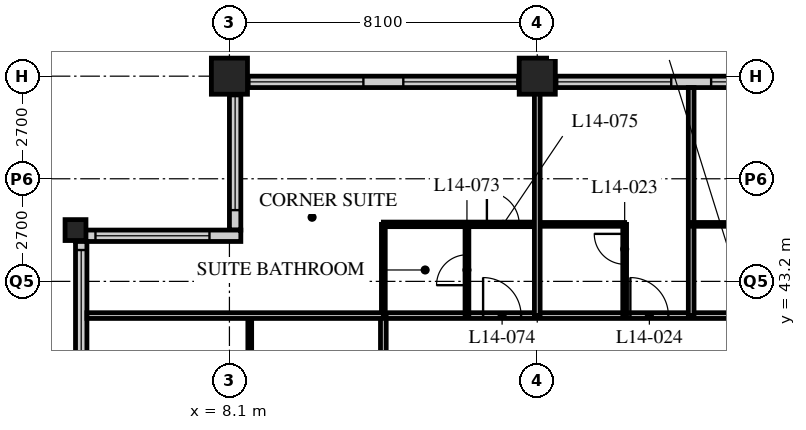
"""IFC4 building model, lengths in metres.
Left out: names, types, materials, properties, quantities, classifications, styles, units other than length and angle.
Written with IfcOpenShell. Run it as: python <this file> out.ifc"""

import sys

from ifc_helpers import new_model, si_unit, direction, frame, frame_2d, origin, origin_2d, place, context, subcontext, project, spatial, rectangle, hollow_rectangle, extrude, element, fill, save


model = new_model("IFC4")
c1 = context("Model", 3, precision=1e-05, world=origin(), true_north=direction((0.0, 1.0)))
c2 = subcontext(c1, "Body", "Model", "MODEL_VIEW")
j1 = project(units=[si_unit("LENGTHUNIT", "METRE"), si_unit("PLANEANGLEUNIT", "RADIAN")], contexts=[c1])
p1 = place(None, origin())
s1 = spatial("IfcSite", under=j1, at=p1, CompositionType="ELEMENT")
p2 = place(p1, origin())
s2 = spatial("IfcBuilding", under=s1, at=p2, CompositionType="ELEMENT")
p3 = place(p2, frame((0.0, 0.0, 60.2)))
s3 = spatial("IfcBuildingStorey", under=s2, at=p3, CompositionType="ELEMENT", Elevation=60.2)
p4 = place(p3, frame((4.05, 44.55, 0.0), z_axis=(0.0, 0.0, 1.0), x_axis=(1.0, 0.0, 0.0)))
e1 = element("IfcColumn", 1, at=p4, inside=s3, PredefinedType="COLUMN", context=c2, shape_type="SweptSolid", body=[
    extrude(hollow_rectangle(XDim=0.55, YDim=0.55, WallThickness=0.05, at=origin_2d()), origin(), (0.0, 0.0, 1.0), 3.4),
])
for number, where, z_axis, x_axis in (
    (2, (8.1, 48.6, 0.0), (0.0, 0.0, 1.0), (1.0, 0.0, 0.0)),
    (3, (16.2, 48.6, 0.0), (0.0, 0.0, 1.0), (1.0, 0.0, 0.0)),
):
    element("IfcColumn", number, at=place(p3, frame(where, z_axis=z_axis, x_axis=x_axis)), inside=s3, PredefinedType="COLUMN", context=c2, shape_type="SweptSolid", body=[
        extrude(hollow_rectangle(XDim=0.95, YDim=0.95, WallThickness=0.095, at=origin_2d()), origin(), (0.0, 0.0, 1.0), 3.4),
    ])
p5 = place(p3, frame((48.3, 48.45, 0.0), z_axis=(0.0, 0.0, 1.0), x_axis=(-1.0, 0.0, 0.0)))
e4 = element("IfcWall", 4, at=p5, inside=s3, PredefinedType="SOLIDWALL", context=c2, shape_type="SweptSolid", body=[
    extrude(rectangle(XDim=40.2, YDim=0.3, at=frame_2d((20.1, 0.0))), origin(), (0.0, 0.0, 1.0), 3.19),
])
p6 = place(p5, frame((0.225, 0.0, 0.9)))
e5 = element("IfcOpeningElement", 5, at=p6, cuts=e4, PredefinedType="OPENING", context=c2, shape_type="SweptSolid", body=[
    extrude(rectangle(XDim=3.0, YDim=2.0, at=frame_2d((1.5, 1.0))), frame((0.0, 0.16, 0.0), z_axis=(0.0, -1.0, 0.0), x_axis=(1.0, 0.0, 0.0)), (0.0, 0.0, 1.0), 0.32),
])
p7 = place(p5, frame((4.275, 0.0, 0.9)))
e6 = element("IfcOpeningElement", 6, at=p7, cuts=e4, PredefinedType="OPENING", context=c2, shape_type="SweptSolid", body=[
    extrude(rectangle(XDim=3.0, YDim=2.0, at=frame_2d((1.5, 1.0))), frame((0.0, 0.16, 0.0), z_axis=(0.0, -1.0, 0.0), x_axis=(1.0, 0.0, 0.0)), (0.0, 0.0, 1.0), 0.32),
])
p8 = place(p5, frame((8.325, 0.0, 0.9)))
e7 = element("IfcOpeningElement", 7, at=p8, cuts=e4, PredefinedType="OPENING", context=c2, shape_type="SweptSolid", body=[
    extrude(rectangle(XDim=3.0, YDim=2.0, at=frame_2d((1.5, 1.0))), frame((0.0, 0.16, 0.0), z_axis=(0.0, -1.0, 0.0), x_axis=(1.0, 0.0, 0.0)), (0.0, 0.0, 1.0), 0.32),
])
p9 = place(p5, frame((12.375, 0.0, 0.9)))
e8 = element("IfcOpeningElement", 8, at=p9, cuts=e4, PredefinedType="OPENING", context=c2, shape_type="SweptSolid", body=[
    extrude(rectangle(XDim=3.0, YDim=2.0, at=frame_2d((1.5, 1.0))), frame((0.0, 0.16, 0.0), z_axis=(0.0, -1.0, 0.0), x_axis=(1.0, 0.0, 0.0)), (0.0, 0.0, 1.0), 0.32),
])
p10 = place(p5, frame((16.425, 0.0, 0.9)))
e9 = element("IfcOpeningElement", 9, at=p10, cuts=e4, PredefinedType="OPENING", context=c2, shape_type="SweptSolid", body=[
    extrude(rectangle(XDim=3.0, YDim=2.0, at=frame_2d((1.5, 1.0))), frame((0.0, 0.16, 0.0), z_axis=(0.0, -1.0, 0.0), x_axis=(1.0, 0.0, 0.0)), (0.0, 0.0, 1.0), 0.32),
])
p11 = place(p5, frame((20.475, 0.0, 0.9)))
e10 = element("IfcOpeningElement", 10, at=p11, cuts=e4, PredefinedType="OPENING", context=c2, shape_type="SweptSolid", body=[
    extrude(rectangle(XDim=3.0, YDim=2.0, at=frame_2d((1.5, 1.0))), frame((0.0, 0.16, 0.0), z_axis=(0.0, -1.0, 0.0), x_axis=(1.0, 0.0, 0.0)), (0.0, 0.0, 1.0), 0.32),
])
p12 = place(p5, frame((24.525, 0.0, 0.9)))
e11 = element("IfcOpeningElement", 11, at=p12, cuts=e4, PredefinedType="OPENING", context=c2, shape_type="SweptSolid", body=[
    extrude(rectangle(XDim=3.0, YDim=2.0, at=frame_2d((1.5, 1.0))), frame((0.0, 0.16, 0.0), z_axis=(0.0, -1.0, 0.0), x_axis=(1.0, 0.0, 0.0)), (0.0, 0.0, 1.0), 0.32),
])
p13 = place(p5, frame((28.575, 0.0, 0.9)))
e12 = element("IfcOpeningElement", 12, at=p13, cuts=e4, PredefinedType="OPENING", context=c2, shape_type="SweptSolid", body=[
    extrude(rectangle(XDim=3.0, YDim=2.0, at=frame_2d((1.5, 1.0))), frame((0.0, 0.16, 0.0), z_axis=(0.0, -1.0, 0.0), x_axis=(1.0, 0.0, 0.0)), (0.0, 0.0, 1.0), 0.32),
])
p14 = place(p5, frame((32.625, 0.0, 0.9)))
e13 = element("IfcOpeningElement", 13, at=p14, cuts=e4, PredefinedType="OPENING", context=c2, shape_type="SweptSolid", body=[
    extrude(rectangle(XDim=3.0, YDim=2.0, at=frame_2d((1.5, 1.0))), frame((0.0, 0.16, 0.0), z_axis=(0.0, -1.0, 0.0), x_axis=(1.0, 0.0, 0.0)), (0.0, 0.0, 1.0), 0.32),
])
p15 = place(p5, frame((36.675, 0.0, 0.9)))
e14 = element("IfcOpeningElement", 14, at=p15, cuts=e4, PredefinedType="OPENING", context=c2, shape_type="SweptSolid", body=[
    extrude(rectangle(XDim=3.0, YDim=2.0, at=frame_2d((1.5, 1.0))), frame((0.0, 0.16, 0.0), z_axis=(0.0, -1.0, 0.0), x_axis=(1.0, 0.0, 0.0)), (0.0, 0.0, 1.0), 0.32),
])
p16 = place(p3, frame((8.25, 48.3, 0.0), z_axis=(0.0, 0.0, 1.0), x_axis=(0.0, -1.0, 0.0)))
e15 = element("IfcWall", 15, at=p16, inside=s3, PredefinedType="SOLIDWALL", context=c2, shape_type="SweptSolid", body=[
    extrude(rectangle(XDim=3.75, YDim=0.3, at=frame_2d((1.875, 0.0))), origin(), (0.0, 0.0, 1.0), 3.19),
])
p17 = place(p16, frame((0.225, 0.0, 0.9)))
e16 = element("IfcOpeningElement", 16, at=p17, cuts=e15, PredefinedType="OPENING", context=c2, shape_type="SweptSolid", body=[
    extrude(rectangle(XDim=3.0, YDim=1.5, at=frame_2d((1.5, 0.75))), frame((0.0, 0.16, 0.0), z_axis=(0.0, -1.0, 0.0), x_axis=(1.0, 0.0, 0.0)), (0.0, 0.0, 1.0), 0.32),
])
p18 = place(p3, frame((8.4, 44.4, 0.0), z_axis=(0.0, 0.0, 1.0), x_axis=(-1.0, 0.0, 0.0)))
e17 = element("IfcWall", 17, at=p18, inside=s3, PredefinedType="SOLIDWALL", context=c2, shape_type="SweptSolid", body=[
    extrude(rectangle(XDim=4.35, YDim=0.3, at=frame_2d((2.175, 0.0))), origin(), (0.0, 0.0, 1.0), 3.19),
])
p19 = place(p18, frame((0.825, 0.0, 0.9)))
e18 = element("IfcOpeningElement", 18, at=p19, cuts=e17, PredefinedType="OPENING", context=c2, shape_type="SweptSolid", body=[
    extrude(rectangle(XDim=3.0, YDim=1.5, at=frame_2d((1.5, 0.75))), frame((0.0, 0.16, 0.0), z_axis=(0.0, -1.0, 0.0), x_axis=(1.0, 0.0, 0.0)), (0.0, 0.0, 1.0), 0.32),
])
p20 = place(p3, frame((4.2, 44.25, 0.0), z_axis=(0.0, 0.0, 1.0), x_axis=(0.0, -1.0, 0.0)))
e19 = element("IfcWall", 19, at=p20, inside=s3, PredefinedType="SOLIDWALL", context=c2, shape_type="SweptSolid", body=[
    extrude(rectangle(XDim=3.75, YDim=0.3, at=frame_2d((1.875, 0.0))), origin(), (0.0, 0.0, 1.0), 3.19),
])
p21 = place(p20, frame((0.225, 0.0, 0.9)))
e20 = element("IfcOpeningElement", 20, at=p21, cuts=e19, PredefinedType="OPENING", context=c2, shape_type="SweptSolid", body=[
    extrude(rectangle(XDim=3.0, YDim=1.5, at=frame_2d((1.5, 0.75))), frame((0.0, 0.16, 0.0), z_axis=(0.0, -1.0, 0.0), x_axis=(1.0, 0.0, 0.0)), (0.0, 0.0, 1.0), 0.32),
])
p22 = place(p3, frame((12.15, 42.3, 0.0), z_axis=(0.0, 0.0, 1.0), x_axis=(1.0, 0.0, 0.0)))
e21 = element("IfcWall", 21, at=p22, inside=s3, PredefinedType="PARTITIONING", context=c2, shape_type="SweptSolid", body=[
    extrude(rectangle(XDim=32.4, YDim=0.15, at=frame_2d((16.2, 0.0))), origin(), (0.0, 0.0, 1.0), 3.19),
])
p23 = place(p22, frame((6.5, 0.0, 0.0)))
e22 = element("IfcOpeningElement", 22, at=p23, cuts=e21, PredefinedType="OPENING", context=c2, shape_type="SweptSolid", body=[
    extrude(rectangle(XDim=1.0, YDim=2.1, at=frame_2d((0.5, 1.05))), frame((0.0, 0.085, 0.0), z_axis=(0.0, -1.0, 0.0), x_axis=(1.0, 0.0, 0.0)), (0.0, 0.0, 1.0), 0.17),
])
p24 = place(p22, frame((10.55, 0.0, 0.0)))
e23 = element("IfcOpeningElement", 23, at=p24, cuts=e21, PredefinedType="OPENING", context=c2, shape_type="SweptSolid", body=[
    extrude(rectangle(XDim=1.0, YDim=2.1, at=frame_2d((0.5, 1.05))), frame((0.0, 0.085, 0.0), z_axis=(0.0, -1.0, 0.0), x_axis=(1.0, 0.0, 0.0)), (0.0, 0.0, 1.0), 0.17),
])
p25 = place(p22, frame((14.6, 0.0, 0.0)))
e24 = element("IfcOpeningElement", 24, at=p25, cuts=e21, PredefinedType="OPENING", context=c2, shape_type="SweptSolid", body=[
    extrude(rectangle(XDim=1.0, YDim=2.1, at=frame_2d((0.5, 1.05))), frame((0.0, 0.085, 0.0), z_axis=(0.0, -1.0, 0.0), x_axis=(1.0, 0.0, 0.0)), (0.0, 0.0, 1.0), 0.17),
])
p26 = place(p22, frame((18.65, 0.0, 0.0)))
e25 = element("IfcOpeningElement", 25, at=p26, cuts=e21, PredefinedType="OPENING", context=c2, shape_type="SweptSolid", body=[
    extrude(rectangle(XDim=1.0, YDim=2.1, at=frame_2d((0.5, 1.05))), frame((0.0, 0.085, 0.0), z_axis=(0.0, -1.0, 0.0), x_axis=(1.0, 0.0, 0.0)), (0.0, 0.0, 1.0), 0.17),
])
p27 = place(p22, frame((22.7, 0.0, 0.0)))
e26 = element("IfcOpeningElement", 26, at=p27, cuts=e21, PredefinedType="OPENING", context=c2, shape_type="SweptSolid", body=[
    extrude(rectangle(XDim=1.0, YDim=2.1, at=frame_2d((0.5, 1.05))), frame((0.0, 0.085, 0.0), z_axis=(0.0, -1.0, 0.0), x_axis=(1.0, 0.0, 0.0)), (0.0, 0.0, 1.0), 0.17),
])
p28 = place(p22, frame((26.75, 0.0, 0.0)))
e27 = element("IfcOpeningElement", 27, at=p28, cuts=e21, PredefinedType="OPENING", context=c2, shape_type="SweptSolid", body=[
    extrude(rectangle(XDim=1.0, YDim=2.1, at=frame_2d((0.5, 1.05))), frame((0.0, 0.085, 0.0), z_axis=(0.0, -1.0, 0.0), x_axis=(1.0, 0.0, 0.0)), (0.0, 0.0, 1.0), 0.17),
])
p29 = place(p22, frame((28.775, 0.0, 0.0)))
e28 = element("IfcOpeningElement", 28, at=p29, cuts=e21, PredefinedType="OPENING", context=c2, shape_type="SweptSolid", body=[
    extrude(rectangle(XDim=1.0, YDim=2.1, at=frame_2d((0.5, 1.05))), frame((0.0, 0.085, 0.0), z_axis=(0.0, -1.0, 0.0), x_axis=(1.0, 0.0, 0.0)), (0.0, 0.0, 1.0), 0.17),
])
p30 = place(p22, frame((2.625, 0.0, 0.0)))
e29 = element("IfcOpeningElement", 29, at=p30, cuts=e21, PredefinedType="OPENING", context=c2, shape_type="SweptSolid", body=[
    extrude(rectangle(XDim=1.0, YDim=2.1, at=frame_2d((0.5, 1.05))), frame((0.0, 0.085, 0.0), z_axis=(0.0, -1.0, 0.0), x_axis=(1.0, 0.0, 0.0)), (0.0, 0.0, 1.0), 0.17),
])
p31 = place(p3, frame((12.15, 12.15, 0.0), z_axis=(0.0, 0.0, 1.0), x_axis=(0.0, 1.0, 0.0)))
e30 = element("IfcWall", 30, at=p31, inside=s3, PredefinedType="PARTITIONING", context=c2, shape_type="SweptSolid", body=[
    extrude(rectangle(XDim=30.15, YDim=0.15, at=frame_2d((15.075, 0.0))), origin(), (0.0, 0.0, 1.0), 3.19),
])
p32 = place(p31, frame((2.45, 0.0, 0.0)))
e31 = element("IfcOpeningElement", 31, at=p32, cuts=e30, PredefinedType="OPENING", context=c2, shape_type="SweptSolid", body=[
    extrude(rectangle(XDim=1.0, YDim=2.1, at=frame_2d((0.5, 1.05))), frame((0.0, 0.085, 0.0), z_axis=(0.0, -1.0, 0.0), x_axis=(1.0, 0.0, 0.0)), (0.0, 0.0, 1.0), 0.17),
])
p33 = place(p31, frame((6.5, 0.0, 0.0)))
e32 = element("IfcOpeningElement", 32, at=p33, cuts=e30, PredefinedType="OPENING", context=c2, shape_type="SweptSolid", body=[
    extrude(rectangle(XDim=1.0, YDim=2.1, at=frame_2d((0.5, 1.05))), frame((0.0, 0.085, 0.0), z_axis=(0.0, -1.0, 0.0), x_axis=(1.0, 0.0, 0.0)), (0.0, 0.0, 1.0), 0.17),
])
p34 = place(p31, frame((10.55, 0.0, 0.0)))
e33 = element("IfcOpeningElement", 33, at=p34, cuts=e30, PredefinedType="OPENING", context=c2, shape_type="SweptSolid", body=[
    extrude(rectangle(XDim=1.0, YDim=2.1, at=frame_2d((0.5, 1.05))), frame((0.0, 0.085, 0.0), z_axis=(0.0, -1.0, 0.0), x_axis=(1.0, 0.0, 0.0)), (0.0, 0.0, 1.0), 0.17),
])
p35 = place(p31, frame((14.6, 0.0, 0.0)))
e34 = element("IfcOpeningElement", 34, at=p35, cuts=e30, PredefinedType="OPENING", context=c2, shape_type="SweptSolid", body=[
    extrude(rectangle(XDim=1.0, YDim=2.1, at=frame_2d((0.5, 1.05))), frame((0.0, 0.085, 0.0), z_axis=(0.0, -1.0, 0.0), x_axis=(1.0, 0.0, 0.0)), (0.0, 0.0, 1.0), 0.17),
])
p36 = place(p31, frame((21.65, 0.0, 0.0)))
e35 = element("IfcOpeningElement", 35, at=p36, cuts=e30, PredefinedType="OPENING", context=c2, shape_type="SweptSolid", body=[
    extrude(rectangle(XDim=1.0, YDim=2.1, at=frame_2d((0.5, 1.05))), frame((0.0, 0.085, 0.0), z_axis=(0.0, -1.0, 0.0), x_axis=(1.0, 0.0, 0.0)), (0.0, 0.0, 1.0), 0.17),
])
p37 = place(p31, frame((26.7, 0.0, 0.0)))
e36 = element("IfcOpeningElement", 36, at=p37, cuts=e30, PredefinedType="OPENING", context=c2, shape_type="SweptSolid", body=[
    extrude(rectangle(XDim=1.0, YDim=2.1, at=frame_2d((0.5, 1.05))), frame((0.0, 0.085, 0.0), z_axis=(0.0, -1.0, 0.0), x_axis=(1.0, 0.0, 0.0)), (0.0, 0.0, 1.0), 0.17),
])
p38 = place(p3, frame((16.2, 44.7, 0.0), z_axis=(0.0, 0.0, 1.0), x_axis=(1.0, 0.0, 0.0)))
e37 = element("IfcWall", 37, at=p38, inside=s3, PredefinedType="PARTITIONING", context=c2, shape_type="SweptSolid", body=[
    extrude(rectangle(XDim=2.3, YDim=0.1, at=frame_2d((1.15, 0.0))), origin(), (0.0, 0.0, 1.0), 3.19),
])
p39 = place(p3, frame((18.5, 42.3, 0.0), z_axis=(0.0, 0.0, 1.0), x_axis=(0.0, 1.0, 0.0)))
e38 = element("IfcWall", 38, at=p39, inside=s3, PredefinedType="PARTITIONING", context=c2, shape_type="SweptSolid", body=[
    extrude(rectangle(XDim=2.4, YDim=0.1, at=frame_2d((1.2, 0.0))), origin(), (0.0, 0.0, 1.0), 3.19),
])
p40 = place(p39, frame((1.35, 0.0, 0.0)))
e39 = element("IfcOpeningElement", 39, at=p40, cuts=e38, PredefinedType="OPENING", context=c2, shape_type="SweptSolid", body=[
    extrude(rectangle(XDim=0.8, YDim=2.1, at=frame_2d((0.4, 1.05))), frame((0.0, 0.06, 0.0), z_axis=(0.0, -1.0, 0.0), x_axis=(1.0, 0.0, 0.0)), (0.0, 0.0, 1.0), 0.12),
])
p41 = place(p3, frame((20.25, 42.3, 0.0), z_axis=(0.0, 0.0, 1.0), x_axis=(0.0, 1.0, 0.0)))
e40 = element("IfcWall", 40, at=p41, inside=s3, PredefinedType="PARTITIONING", context=c2, shape_type="SweptSolid", body=[
    extrude(rectangle(XDim=6.0, YDim=0.15, at=frame_2d((3.0, 0.0))), origin(), (0.0, 0.0, 1.0), 3.19),
])
for number, where, z_axis, x_axis in (
    (41, (20.25, 44.7, 0.0), (0.0, 0.0, 1.0), (1.0, 0.0, 0.0)),
    (42, (8.635, 40.0, 0.0), (0.0, 0.0, 1.0), (0.0, 1.0, 0.0)),
):
    element("IfcWall", number, at=place(p3, frame(where, z_axis=z_axis, x_axis=x_axis)), inside=s3, PredefinedType="PARTITIONING", context=c2, shape_type="SweptSolid", body=[
        extrude(rectangle(XDim=2.3, YDim=0.1, at=frame_2d((1.15, 0.0))), origin(), (0.0, 0.0, 1.0), 3.19),
    ])
p42 = place(p3, frame((12.15, 44.7, 0.0), z_axis=(0.0, 0.0, 1.0), x_axis=(1.0, 0.0, 0.0)))
e43 = element("IfcWall", 43, at=p42, inside=s3, PredefinedType="PARTITIONING", context=c2, shape_type="SweptSolid", body=[
    extrude(rectangle(XDim=4.05, YDim=0.12, at=frame_2d((2.025, 0.0))), origin(), (0.0, 0.0, 1.0), 3.19),
])
p43 = place(p42, frame((2.725, 0.0, 0.0)))
e44 = element("IfcOpeningElement", 44, at=p43, cuts=e43, PredefinedType="OPENING", context=c2, shape_type="SweptSolid", body=[
    extrude(rectangle(XDim=0.85, YDim=2.1, at=frame_2d((0.425, 1.05))), frame((0.0, 0.07, 0.0), z_axis=(0.0, -1.0, 0.0), x_axis=(1.0, 0.0, 0.0)), (0.0, 0.0, 1.0), 0.14),
])
p44 = place(p3, frame((14.35, 42.3, 0.0), z_axis=(0.0, 0.0, 1.0), x_axis=(0.0, 1.0, 0.0)))
e45 = element("IfcWall", 45, at=p44, inside=s3, PredefinedType="PARTITIONING", context=c2, shape_type="SweptSolid", body=[
    extrude(rectangle(XDim=2.4, YDim=0.1, at=frame_2d((1.2, 0.0))), origin(), (0.0, 0.0, 1.0), 3.19),
])
p45 = place(p44, frame((0.8, 0.0, 0.0)))
e46 = element("IfcOpeningElement", 46, at=p45, cuts=e45, PredefinedType="OPENING", context=c2, shape_type="SweptSolid", body=[
    extrude(rectangle(XDim=0.8, YDim=2.1, at=frame_2d((0.4, 1.05))), frame((0.0, 0.06, 0.0), z_axis=(0.0, -1.0, 0.0), x_axis=(1.0, 0.0, 0.0)), (0.0, 0.0, 1.0), 0.12),
])
p46 = place(p3, frame((12.15, 42.3, 0.0), z_axis=(0.0, 0.0, 1.0), x_axis=(0.0, 1.0, 0.0)))
e47 = element("IfcWall", 47, at=p46, inside=s3, PredefinedType="PARTITIONING", context=c2, shape_type="SweptSolid", body=[
    extrude(rectangle(XDim=2.4, YDim=0.1, at=frame_2d((1.2, 0.0))), origin(), (0.0, 0.0, 1.0), 3.19),
])
p47 = place(p3, frame((4.35, 42.3, 0.0), z_axis=(0.0, 0.0, 1.0), x_axis=(1.0, 0.0, 0.0)))
e48 = element("IfcWall", 48, at=p47, inside=s3, PredefinedType="PARTITIONING", context=c2, shape_type="SweptSolid", body=[
    extrude(rectangle(XDim=7.8, YDim=0.15, at=frame_2d((3.9, 0.0))), origin(), (0.0, 0.0, 1.0), 3.19),
])
p48 = place(p3, frame((16.2, 42.3, 0.0), z_axis=(0.0, 0.0, 1.0), x_axis=(0.0, 1.0, 0.0)))
e49 = element("IfcWall", 49, at=p48, inside=s3, PredefinedType="PARTITIONING", context=c2, shape_type="SweptSolid", body=[
    extrude(rectangle(XDim=6.0, YDim=0.15, at=frame_2d((3.0, 0.0))), origin(), (0.0, 0.0, 1.0), 2.578),
])
p49 = place(p12, origin())
e50 = element("IfcWindow", 50, at=p49, inside=s3, PartitioningType="SINGLE_PANEL", PredefinedType="WINDOW", context=c2, shape_type="SweptSolid", body=[
    extrude(rectangle(XDim=3.0, YDim=2.0, at=frame_2d((1.5, 1.0))), frame((0.0, 0.03, 0.0), z_axis=(0.0, -1.0, 0.0), x_axis=(1.0, 0.0, 0.0)), (0.0, 0.0, 1.0), 0.06),
])
fill(e11, e50)
p50 = place(p13, origin())
e51 = element("IfcWindow", 51, at=p50, inside=s3, PartitioningType="SINGLE_PANEL", PredefinedType="WINDOW", context=c2, shape_type="SweptSolid", body=[
    extrude(rectangle(XDim=3.0, YDim=2.0, at=frame_2d((1.5, 1.0))), frame((0.0, 0.03, 0.0), z_axis=(0.0, -1.0, 0.0), x_axis=(1.0, 0.0, 0.0)), (0.0, 0.0, 1.0), 0.06),
])
fill(e12, e51)
p51 = place(p14, origin())
e52 = element("IfcWindow", 52, at=p51, inside=s3, PartitioningType="SINGLE_PANEL", PredefinedType="WINDOW", context=c2, shape_type="SweptSolid", body=[
    extrude(rectangle(XDim=3.0, YDim=2.0, at=frame_2d((1.5, 1.0))), frame((0.0, 0.03, 0.0), z_axis=(0.0, -1.0, 0.0), x_axis=(1.0, 0.0, 0.0)), (0.0, 0.0, 1.0), 0.06),
])
fill(e13, e52)
p52 = place(p15, origin())
e53 = element("IfcWindow", 53, at=p52, inside=s3, PartitioningType="SINGLE_PANEL", PredefinedType="WINDOW", context=c2, shape_type="SweptSolid", body=[
    extrude(rectangle(XDim=3.0, YDim=2.0, at=frame_2d((1.5, 1.0))), frame((0.0, 0.03, 0.0), z_axis=(0.0, -1.0, 0.0), x_axis=(1.0, 0.0, 0.0)), (0.0, 0.0, 1.0), 0.06),
])
fill(e14, e53)
p53 = place(p17, origin())
e54 = element("IfcWindow", 54, at=p53, inside=s3, PartitioningType="SINGLE_PANEL", PredefinedType="WINDOW", context=c2, shape_type="SweptSolid", body=[
    extrude(rectangle(XDim=3.0, YDim=1.5, at=frame_2d((1.5, 0.75))), frame((0.0, 0.03, 0.0), z_axis=(0.0, -1.0, 0.0), x_axis=(1.0, 0.0, 0.0)), (0.0, 0.0, 1.0), 0.06),
])
fill(e16, e54)
p54 = place(p19, origin())
e55 = element("IfcWindow", 55, at=p54, inside=s3, PartitioningType="SINGLE_PANEL", PredefinedType="WINDOW", context=c2, shape_type="SweptSolid", body=[
    extrude(rectangle(XDim=3.0, YDim=1.5, at=frame_2d((1.5, 0.75))), frame((0.0, 0.03, 0.0), z_axis=(0.0, -1.0, 0.0), x_axis=(1.0, 0.0, 0.0)), (0.0, 0.0, 1.0), 0.06),
])
fill(e18, e55)
p55 = place(p21, origin())
e56 = element("IfcWindow", 56, at=p55, inside=s3, PartitioningType="SINGLE_PANEL", PredefinedType="WINDOW", context=c2, shape_type="SweptSolid", body=[
    extrude(rectangle(XDim=3.0, YDim=1.5, at=frame_2d((1.5, 0.75))), frame((0.0, 0.03, 0.0), z_axis=(0.0, -1.0, 0.0), x_axis=(1.0, 0.0, 0.0)), (0.0, 0.0, 1.0), 0.06),
])
fill(e20, e56)
p56 = place(p40, origin())
e57 = element("IfcDoor", 57, at=p56, inside=s3, OperationType="SINGLE_SWING_RIGHT", PredefinedType="DOOR", context=c2, shape_type="SweptSolid", body=[
    extrude(rectangle(XDim=0.8, YDim=2.1, at=frame_2d((0.4, 1.05))), frame((0.0, 0.025, 0.0), z_axis=(0.0, -1.0, 0.0), x_axis=(1.0, 0.0, 0.0)), (0.0, 0.0, 1.0), 0.05),
])
fill(e39, e57)
p57 = place(p23, origin())
e58 = element("IfcDoor", 58, at=p57, inside=s3, OperationType="SINGLE_SWING_LEFT", PredefinedType="DOOR", context=c2, shape_type="SweptSolid", body=[
    extrude(rectangle(XDim=1.0, YDim=2.1, at=frame_2d((0.5, 1.05))), frame((0.0, 0.025, 0.0), z_axis=(0.0, -1.0, 0.0), x_axis=(1.0, 0.0, 0.0)), (0.0, 0.0, 1.0), 0.05),
])
fill(e22, e58)
p58 = place(p45, origin())
e59 = element("IfcDoor", 59, at=p58, inside=s3, OperationType="SINGLE_SWING_LEFT", PredefinedType="DOOR", context=c2, shape_type="SweptSolid", body=[
    extrude(rectangle(XDim=0.8, YDim=2.1, at=frame_2d((0.4, 1.05))), frame((0.0, 0.025, 0.0), z_axis=(0.0, -1.0, 0.0), x_axis=(1.0, 0.0, 0.0)), (0.0, 0.0, 1.0), 0.05),
])
fill(e46, e59)
p59 = place(p30, origin())
e60 = element("IfcDoor", 60, at=p59, inside=s3, OperationType="SINGLE_SWING_LEFT", PredefinedType="DOOR", context=c2, shape_type="SweptSolid", body=[
    extrude(rectangle(XDim=1.0, YDim=2.1, at=frame_2d((0.5, 1.05))), frame((0.0, 0.025, 0.0), z_axis=(0.0, -1.0, 0.0), x_axis=(1.0, 0.0, 0.0)), (0.0, 0.0, 1.0), 0.05),
])
fill(e29, e60)
p60 = place(p43, origin())
e61 = element("IfcDoor", 61, at=p60, inside=s3, OperationType="SINGLE_SWING_LEFT", PredefinedType="DOOR", context=c2, shape_type="SweptSolid", body=[
    extrude(rectangle(XDim=0.85, YDim=2.1, at=frame_2d((0.425, 1.05))), frame((0.0, 0.025, 0.0), z_axis=(0.0, -1.0, 0.0), x_axis=(1.0, 0.0, 0.0)), (0.0, 0.0, 1.0), 0.05),
])
fill(e44, e61)
save(model, sys.argv[1])
